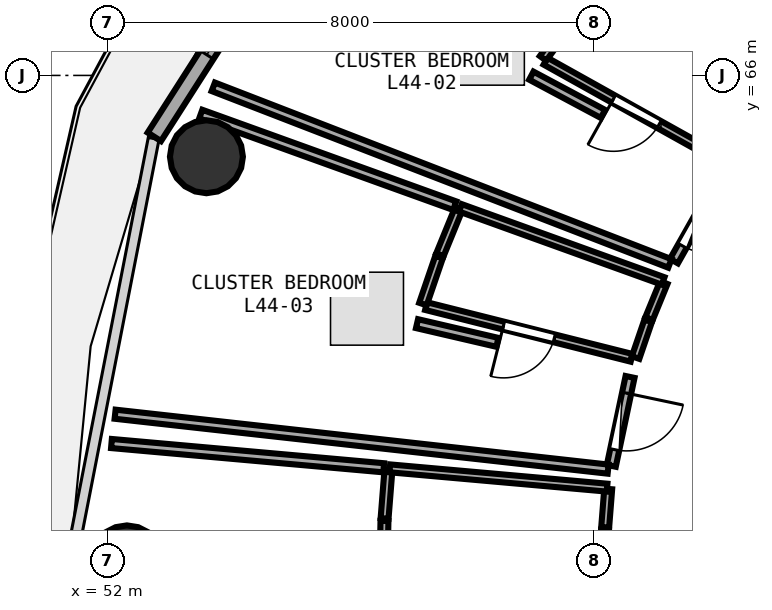
"""IFC4 building model, lengths in metres.
Left out: names, types, materials, properties, quantities, classifications, styles, units other than length and angle.
Written with IfcOpenShell. Run it as: python <this file> out.ifc"""

import sys

from ifc_helpers import new_model, si_unit, direction, frame, frame_2d, origin, origin_2d, place, context, subcontext, project, spatial, rectangle, circle, extrude, element, fill, save


model = new_model("IFC4")
c1 = context("Model", 3, precision=1e-05, world=origin(), true_north=direction((0.0, 1.0)))
c2 = subcontext(c1, "Body", "Model", "MODEL_VIEW")
j1 = project(units=[si_unit("LENGTHUNIT", "METRE"), si_unit("PLANEANGLEUNIT", "RADIAN")], contexts=[c1])
p1 = place(None, origin())
s1 = spatial("IfcSite", under=j1, at=p1, CompositionType="ELEMENT")
p2 = place(p1, origin())
s2 = spatial("IfcBuilding", under=s1, at=p2, CompositionType="ELEMENT")
p3 = place(p2, frame((0.0, 0.0, 173.1)))
s3 = spatial("IfcBuildingStorey", under=s2, at=p3, CompositionType="ELEMENT", Elevation=173.1)
for number, where, z_axis, x_axis in (
    (1, (53.627, 64.663, 0.0), (0.0, 0.0, 1.0), (1.0, 0.0, 0.0)),
    (2, (52.32, 58.0, 0.0), (0.0, 0.0, 1.0), (1.0, 0.0, 0.0)),
):
    element("IfcColumn", number, at=place(p3, frame(where, z_axis=z_axis, x_axis=x_axis)), inside=s3, PredefinedType="COLUMN", context=c2, shape_type="SweptSolid", body=[
        extrude(circle(Radius=0.6, at=origin_2d()), origin(), (0.0, 0.0, 1.0), 3.75),
    ])
p4 = place(p3, frame((56.679, 71.1, 0.0), z_axis=(0.0, 0.0, 1.0), x_axis=(-0.538801521808, -0.842432739213, 0.0)))
e3 = element("IfcWall", 3, at=p4, inside=s3, PredefinedType="SOLIDWALL", context=c2, shape_type="SweptSolid", body=[
    extrude(rectangle(XDim=7.253, YDim=0.26, at=frame_2d((3.627, 0.0))), origin(), (0.0, 0.0, 1.0), 3.475),
])
p5 = place(p4, frame((3.152, 0.0, 0.0)))
e4 = element("IfcOpeningElement", 4, at=p5, cuts=e3, PredefinedType="OPENING", context=c2, shape_type="SweptSolid", body=[
    extrude(rectangle(XDim=0.95, YDim=2.1, at=frame_2d((0.475, 1.05))), frame((0.0, 0.14, 0.0), z_axis=(0.0, -1.0, 0.0), x_axis=(1.0, 0.0, 0.0)), (0.0, 0.0, 1.0), 0.28),
])
p6 = place(p4, frame((4.452, 0.0, 0.85)))
e5 = element("IfcOpeningElement", 5, at=p6, cuts=e3, PredefinedType="OPENING", context=c2, shape_type="SweptSolid", body=[
    extrude(rectangle(XDim=1.2, YDim=1.45, at=frame_2d((0.6, 0.725))), frame((0.0, 0.14, 0.0), z_axis=(0.0, -1.0, 0.0), x_axis=(1.0, 0.0, 0.0)), (0.0, 0.0, 1.0), 0.28),
])
p7 = place(p3, frame((62.188, 64.57, 0.0), z_axis=(0.0, 0.0, 1.0), x_axis=(-0.873255694646, 0.487262241271, 0.0)))
e6 = element("IfcWall", 6, at=p7, inside=s3, PredefinedType="PLUMBINGWALL", context=c2, shape_type="SweptSolid", body=[
    extrude(rectangle(XDim=3.416, YDim=0.13, at=frame_2d((1.708, 0.0))), origin(), (0.0, 0.0, 1.0), 2.975),
])
p8 = place(p7, frame((1.278, 0.0, 0.0)))
e7 = element("IfcOpeningElement", 7, at=p8, cuts=e6, PredefinedType="OPENING", context=c2, shape_type="SweptSolid", body=[
    extrude(rectangle(XDim=0.86, YDim=2.05, at=frame_2d((0.43, 1.025))), frame((0.0, 0.075, 0.0), z_axis=(0.0, -1.0, 0.0), x_axis=(1.0, 0.0, 0.0)), (0.0, 0.0, 1.0), 0.15),
])
p9 = place(p3, frame((62.066, 64.275, 0.0), z_axis=(0.0, 0.0, 1.0), x_axis=(-0.491582624537, -0.870830938388, 0.0)))
e8 = element("IfcWall", 8, at=p9, inside=s3, PredefinedType="PARTITIONING", context=c2, shape_type="SweptSolid", body=[
    extrude(rectangle(XDim=1.526, YDim=0.15, at=frame_2d((0.763, 0.0))), origin(), (0.0, 0.0, 1.0), 3.235),
])
p10 = place(p9, frame((0.288, 0.0, 0.0)))
e9 = element("IfcOpeningElement", 9, at=p10, cuts=e8, PredefinedType="OPENING", context=c2, shape_type="SweptSolid", body=[
    extrude(rectangle(XDim=0.95, YDim=2.08, at=frame_2d((0.475, 1.04))), frame((0.0, 0.085, 0.0), z_axis=(0.0, -1.0, 0.0), x_axis=(1.0, 0.0, 0.0)), (0.0, 0.0, 1.0), 0.17),
])
p11 = place(p3, frame((60.621, 61.356, 0.0), z_axis=(0.0, 0.0, 1.0), x_axis=(-0.969774737706, 0.244001963326, 0.0)))
e10 = element("IfcWall", 10, at=p11, inside=s3, PredefinedType="PLUMBINGWALL", context=c2, shape_type="SweptSolid", body=[
    extrude(rectangle(XDim=3.486, YDim=0.13, at=frame_2d((1.743, 0.0))), origin(), (0.0, 0.0, 1.0), 3.175),
])
p12 = place(p11, frame((1.313, 0.0, 0.0)))
e11 = element("IfcOpeningElement", 11, at=p12, cuts=e10, PredefinedType="OPENING", context=c2, shape_type="SweptSolid", body=[
    extrude(rectangle(XDim=0.86, YDim=2.05, at=frame_2d((0.43, 1.025))), frame((0.0, 0.075, 0.0), z_axis=(0.0, -1.0, 0.0), x_axis=(1.0, 0.0, 0.0)), (0.0, 0.0, 1.0), 0.15),
])
p13 = place(p3, frame((60.594, 61.041, 0.0), z_axis=(0.0, 0.0, 1.0), x_axis=(-0.206257580925, -0.978497731378, 0.0)))
e12 = element("IfcWall", 12, at=p13, inside=s3, PredefinedType="PARTITIONING", context=c2, shape_type="SweptSolid", body=[
    extrude(rectangle(XDim=1.494, YDim=0.15, at=frame_2d((0.747, 0.0))), origin(), (0.0, 0.0, 1.0), 3.48),
])
p14 = place(p13, frame((0.272, 0.0, 0.0)))
e13 = element("IfcOpeningElement", 13, at=p14, cuts=e12, PredefinedType="OPENING", context=c2, shape_type="SweptSolid", body=[
    extrude(rectangle(XDim=0.95, YDim=2.08, at=frame_2d((0.475, 1.04))), frame((0.0, 0.085, 0.0), z_axis=(0.0, -1.0, 0.0), x_axis=(1.0, 0.0, 0.0)), (0.0, 0.0, 1.0), 0.17),
])
p15 = place(p3, frame((63.272, 65.904, 0.0), z_axis=(0.0, 0.0, 1.0), x_axis=(-0.803728632682, 0.594996037808, 0.0)))
e14 = element("IfcWall", 14, at=p15, inside=s3, PredefinedType="PARTITIONING", context=c2, shape_type="SweptSolid", body=[
    extrude(rectangle(XDim=6.886, YDim=0.15, at=frame_2d((3.443, 0.0))), origin(), (0.0, 0.0, 1.0), 3.175),
])
p16 = place(p3, frame((59.164, 66.28, 0.0), z_axis=(0.0, 0.0, 1.0), x_axis=(0.589885116714, 0.807487181991, 0.0)))
e15 = element("IfcWall", 15, at=p16, inside=s3, PredefinedType="PLUMBINGWALL", context=c2, shape_type="SweptSolid", body=[
    extrude(rectangle(XDim=0.838, YDim=0.13, at=frame_2d((0.419, 0.0))), origin(), (0.0, 0.0, 1.0), 3.48),
])
p17 = place(p3, frame((60.246, 67.646, 0.0), z_axis=(0.0, 0.0, 1.0), x_axis=(0.817907250539, -0.575350093, 0.0)))
e16 = element("IfcWall", 16, at=p17, inside=s3, PredefinedType="PLUMBINGWALL", context=c2, shape_type="SweptSolid", body=[
    extrude(rectangle(XDim=3.46, YDim=0.13, at=frame_2d((1.73, 0.0))), origin(), (0.0, 0.0, 1.0), 3.175),
])
p18 = place(p3, frame((61.25, 62.908, 0.0), z_axis=(0.0, 0.0, 1.0), x_axis=(-0.932687580633, 0.360685287936, 0.0)))
e17 = element("IfcWall", 17, at=p18, inside=s3, PredefinedType="PARTITIONING", context=c2, shape_type="SweptSolid", body=[
    extrude(rectangle(XDim=8.052, YDim=0.15, at=frame_2d((4.026, 0.0))), origin(), (0.0, 0.0, 1.0), 2.975),
])
p19 = place(p3, frame((58.971, 65.996, 0.0), z_axis=(0.0, 0.0, 1.0), x_axis=(0.882039066957, -0.471176277376, 0.0)))
e18 = element("IfcWall", 18, at=p19, inside=s3, PredefinedType="PARTITIONING", context=c2, shape_type="SweptSolid", body=[
    extrude(rectangle(XDim=1.336, YDim=0.15, at=frame_2d((0.668, 0.0))), origin(), (0.0, 0.0, 1.0), 3.175),
])
p20 = place(p3, frame((61.15, 62.594, 0.0), z_axis=(0.0, 0.0, 1.0), x_axis=(-0.38036677213, -0.924835725229, 0.0)))
e19 = element("IfcWall", 19, at=p20, inside=s3, PredefinedType="PLUMBINGWALL", context=c2, shape_type="SweptSolid", body=[
    extrude(rectangle(XDim=0.641, YDim=0.13, at=frame_2d((0.321, 0.0))), origin(), (0.0, 0.0, 1.0), 3.235),
])
p21 = place(p3, frame((60.893, 61.964, 0.0), z_axis=(0.0, 0.0, 1.0), x_axis=(-0.324128876048, -0.94601293422, 0.0)))
e20 = element("IfcWall", 20, at=p21, inside=s3, PredefinedType="PLUMBINGWALL", context=c2, shape_type="SweptSolid", body=[
    extrude(rectangle(XDim=0.639, YDim=0.13, at=frame_2d((0.319, 0.0))), origin(), (0.0, 0.0, 1.0), 3.48),
])
p22 = place(p3, frame((57.188, 62.24, 0.0), z_axis=(0.0, 0.0, 1.0), x_axis=(0.324370140969, 0.945930236142, 0.0)))
e21 = element("IfcWall", 21, at=p22, inside=s3, PredefinedType="PLUMBINGWALL", context=c2, shape_type="SweptSolid", body=[
    extrude(rectangle(XDim=0.817, YDim=0.13, at=frame_2d((0.409, 0.0))), origin(), (0.0, 0.0, 1.0), 3.48),
])
p23 = place(p3, frame((57.468, 63.051, 0.0), z_axis=(0.0, 0.0, 1.0), x_axis=(0.378505488692, 0.92559904658, 0.0)))
e22 = element("IfcWall", 22, at=p23, inside=s3, PredefinedType="PLUMBINGWALL", context=c2, shape_type="SweptSolid", body=[
    extrude(rectangle(XDim=0.821, YDim=0.13, at=frame_2d((0.411, 0.0))), origin(), (0.0, 0.0, 1.0), 3.48),
])
p24 = place(p3, frame((57.805, 63.822, 0.0), z_axis=(0.0, 0.0, 1.0), x_axis=(0.940709042882, -0.339214528935, 0.0)))
e23 = element("IfcWall", 23, at=p24, inside=s3, PredefinedType="PLUMBINGWALL", context=c2, shape_type="SweptSolid", body=[
    extrude(rectangle(XDim=3.545, YDim=0.13, at=frame_2d((1.772, 0.0))), origin(), (0.0, 0.0, 1.0), 3.175),
])
p25 = place(p3, frame((60.234, 59.525, 0.0), z_axis=(0.0, 0.0, 1.0), x_axis=(-0.99385157858, 0.110720548017, 0.0)))
e24 = element("IfcWall", 24, at=p25, inside=s3, PredefinedType="PARTITIONING", context=c2, shape_type="SweptSolid", body=[
    extrude(rectangle(XDim=8.158, YDim=0.15, at=frame_2d((4.079, 0.0))), origin(), (0.0, 0.0, 1.0), 3.025),
])
p26 = place(p3, frame((53.535, 65.365, 0.0), z_axis=(0.0, 0.0, 1.0), x_axis=(0.940657292565, -0.339358008517, 0.0)))
e25 = element("IfcWall", 25, at=p26, inside=s3, PredefinedType="PARTITIONING", context=c2, shape_type="SweptSolid", body=[
    extrude(rectangle(XDim=4.44, YDim=0.15, at=frame_2d((2.22, 0.0))), origin(), (0.0, 0.0, 1.0), 2.975),
])
p27 = place(p3, frame((57.091, 61.918, 0.0), z_axis=(0.0, 0.0, 1.0), x_axis=(0.973980333704, -0.226632543023, 0.0)))
e26 = element("IfcWall", 26, at=p27, inside=s3, PredefinedType="PARTITIONING", context=c2, shape_type="SweptSolid", body=[
    extrude(rectangle(XDim=1.357, YDim=0.15, at=frame_2d((0.679, 0.0))), origin(), (0.0, 0.0, 1.0), 3.175),
])
p28 = place(p3, frame((60.235, 59.199, 0.0), z_axis=(0.0, 0.0, 1.0), x_axis=(-0.078763069799, -0.996893363824, 0.0)))
e27 = element("IfcWall", 27, at=p28, inside=s3, PredefinedType="PLUMBINGWALL", context=c2, shape_type="SweptSolid", body=[
    extrude(rectangle(XDim=0.632, YDim=0.13, at=frame_2d((0.316, 0.0))), origin(), (0.0, 0.0, 1.0), 3.48),
])
p29 = place(p3, frame((60.184, 58.529, 0.0), z_axis=(0.0, 0.0, 1.0), x_axis=(-0.019338742534, -0.999812989032, 0.0)))
e28 = element("IfcWall", 28, at=p29, inside=s3, PredefinedType="PLUMBINGWALL", context=c2, shape_type="SweptSolid", body=[
    extrude(rectangle(XDim=0.631, YDim=0.13, at=frame_2d((0.315, 0.0))), origin(), (0.0, 0.0, 1.0), 2.975),
])
p30 = place(p3, frame((56.54, 57.865, 0.0), z_axis=(0.0, 0.0, 1.0), x_axis=(0.019006825377, 0.999819353978, 0.0)))
e29 = element("IfcWall", 29, at=p30, inside=s3, PredefinedType="PLUMBINGWALL", context=c2, shape_type="SweptSolid", body=[
    extrude(rectangle(XDim=0.809, YDim=0.13, at=frame_2d((0.405, 0.0))), origin(), (0.0, 0.0, 1.0), 2.975),
])
p31 = place(p3, frame((56.558, 58.714, 0.0), z_axis=(0.0, 0.0, 1.0), x_axis=(0.078797232985, 0.996890664052, 0.0)))
e30 = element("IfcWall", 30, at=p31, inside=s3, PredefinedType="PLUMBINGWALL", context=c2, shape_type="SweptSolid", body=[
    extrude(rectangle(XDim=0.809, YDim=0.13, at=frame_2d((0.404, 0.0))), origin(), (0.0, 0.0, 1.0), 3.48),
])
p32 = place(p3, frame((56.643, 59.538, 0.0), z_axis=(0.0, 0.0, 1.0), x_axis=(0.99608063721, -0.088449783359, 0.0)))
e31 = element("IfcWall", 31, at=p32, inside=s3, PredefinedType="PLUMBINGWALL", context=c2, shape_type="SweptSolid", body=[
    extrude(rectangle(XDim=3.588, YDim=0.13, at=frame_2d((1.794, 0.0))), origin(), (0.0, 0.0, 1.0), 3.175),
])
p33 = place(p3, frame((52.066, 59.947, 0.0), z_axis=(0.0, 0.0, 1.0), x_axis=(0.996054097512, -0.088748153952, 0.0)))
e32 = element("IfcWall", 32, at=p33, inside=s3, PredefinedType="PARTITIONING", context=c2, shape_type="SweptSolid", body=[
    extrude(rectangle(XDim=4.495, YDim=0.15, at=frame_2d((2.248, 0.0))), origin(), (0.0, 0.0, 1.0), 3.025),
])
p34 = place(p6, origin())
e33 = element("IfcWindow", 33, at=p34, inside=s3, PartitioningType="SINGLE_PANEL", PredefinedType="WINDOW", context=c2, shape_type="SweptSolid", body=[
    extrude(rectangle(XDim=1.2, YDim=1.45, at=frame_2d((0.6, 0.725))), frame((0.0, 0.03, 0.0), z_axis=(0.0, -1.0, 0.0), x_axis=(1.0, 0.0, 0.0)), (0.0, 0.0, 1.0), 0.06),
])
fill(e5, e33)
p35 = place(p8, origin())
e34 = element("IfcDoor", 34, at=p35, inside=s3, OperationType="SINGLE_SWING_RIGHT", PredefinedType="DOOR", context=c2, shape_type="SweptSolid", body=[
    extrude(rectangle(XDim=0.86, YDim=2.05, at=frame_2d((0.43, 1.025))), frame((0.0, 0.025, 0.0), z_axis=(0.0, -1.0, 0.0), x_axis=(1.0, 0.0, 0.0)), (0.0, 0.0, 1.0), 0.05),
])
fill(e7, e34)
p36 = place(p10, origin())
e35 = element("IfcDoor", 35, at=p36, inside=s3, OperationType="SINGLE_SWING_LEFT", PredefinedType="DOOR", context=c2, shape_type="SweptSolid", body=[
    extrude(rectangle(XDim=0.95, YDim=2.08, at=frame_2d((0.475, 1.04))), frame((0.0, 0.025, 0.0), z_axis=(0.0, -1.0, 0.0), x_axis=(1.0, 0.0, 0.0)), (0.0, 0.0, 1.0), 0.05),
])
fill(e9, e35)
p37 = place(p12, origin())
e36 = element("IfcDoor", 36, at=p37, inside=s3, OperationType="SINGLE_SWING_RIGHT", PredefinedType="DOOR", context=c2, shape_type="SweptSolid", body=[
    extrude(rectangle(XDim=0.86, YDim=2.05, at=frame_2d((0.43, 1.025))), frame((0.0, 0.025, 0.0), z_axis=(0.0, -1.0, 0.0), x_axis=(1.0, 0.0, 0.0)), (0.0, 0.0, 1.0), 0.05),
])
fill(e11, e36)
p38 = place(p14, origin())
e37 = element("IfcDoor", 37, at=p38, inside=s3, OperationType="SINGLE_SWING_LEFT", PredefinedType="DOOR", context=c2, shape_type="SweptSolid", body=[
    extrude(rectangle(XDim=0.95, YDim=2.08, at=frame_2d((0.475, 1.04))), frame((0.0, 0.025, 0.0), z_axis=(0.0, -1.0, 0.0), x_axis=(1.0, 0.0, 0.0)), (0.0, 0.0, 1.0), 0.05),
])
fill(e13, e37)
save(model, sys.argv[1])
